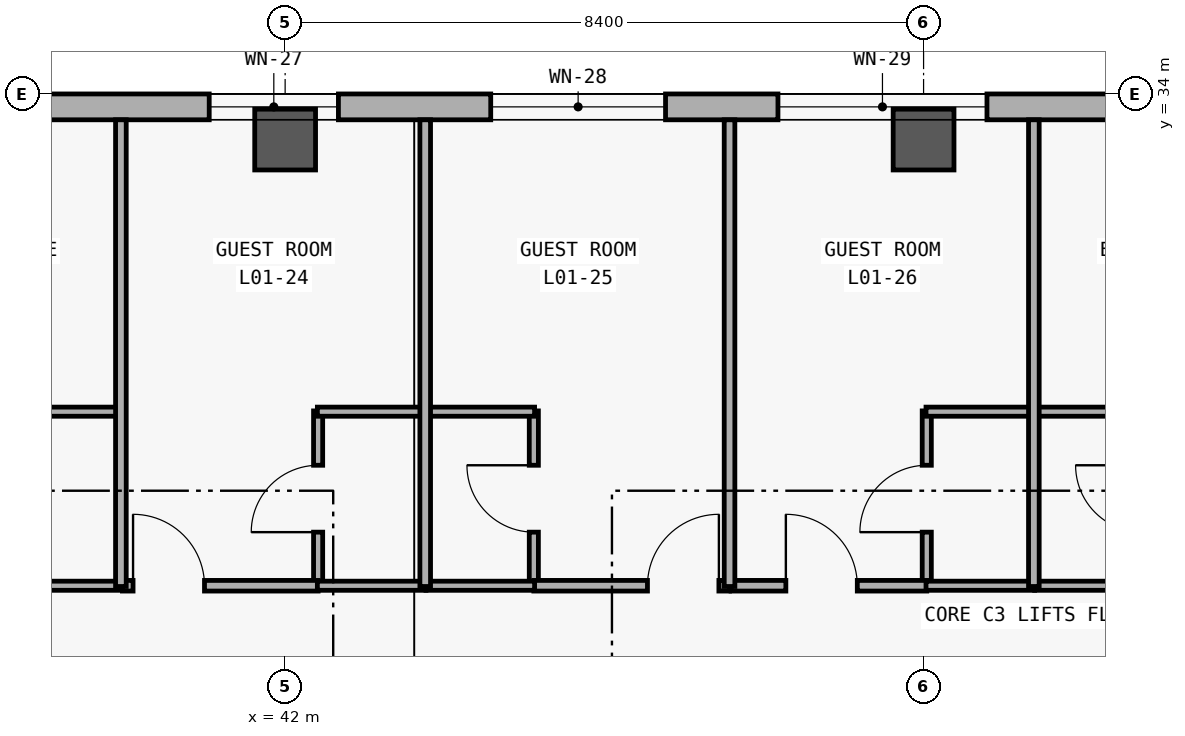
"""IFC4 building model, lengths in metres.
Left out: names, types, materials, properties, quantities, classifications, styles, units other than length and angle.
Written with IfcOpenShell. Run it as: python <this file> out.ifc"""

import sys

from ifc_helpers import new_model, si_unit, direction, frame, frame_2d, origin, origin_2d, place, context, subcontext, project, spatial, rectangle, extrude, element, fill, save


model = new_model("IFC4")
c1 = context("Model", 3, precision=1e-05, world=origin(), true_north=direction((0.0, 1.0)))
c2 = subcontext(c1, "Body", "Model", "MODEL_VIEW")
j1 = project(units=[si_unit("LENGTHUNIT", "METRE"), si_unit("PLANEANGLEUNIT", "RADIAN")], contexts=[c1])
p1 = place(None, origin())
s1 = spatial("IfcSite", under=j1, at=p1, CompositionType="ELEMENT")
p2 = place(p1, origin())
s2 = spatial("IfcBuilding", under=s1, at=p2, CompositionType="ELEMENT")
p3 = place(p2, frame((0.0, 0.0, 5.4)))
s3 = spatial("IfcBuildingStorey", under=s2, at=p3, CompositionType="ELEMENT", Elevation=5.4)
for number, where, z_axis, x_axis in (
    (1, (42.0, 33.4, 0.0), (0.0, 0.0, 1.0), (1.0, 0.0, 0.0)),
    (2, (50.4, 33.4, 0.0), (0.0, 0.0, 1.0), (1.0, 0.0, 0.0)),
):
    element("IfcColumn", number, at=place(p3, frame(where, z_axis=z_axis, x_axis=x_axis)), inside=s3, PredefinedType="COLUMN", context=c2, shape_type="SweptSolid", body=[
        extrude(rectangle(XDim=0.8, YDim=0.8, at=origin_2d()), origin(), (0.0, 0.0, 1.0), 5.4),
    ])
p4 = place(p3, frame((8.74, 33.83, 0.0), z_axis=(0.0, 0.0, 1.0), x_axis=(1.0, 0.0, 0.0)))
e3 = element("IfcWall", 3, at=p4, inside=s3, PredefinedType="SOLIDWALL", context=c2, shape_type="SweptSolid", body=[
    extrude(rectangle(XDim=83.32, YDim=0.34, at=frame_2d((41.66, 0.0))), origin(), (0.0, 0.0, 1.0), 5.1),
])
p5 = place(p4, frame((4.795, 0.0, 0.85)))
e4 = element("IfcOpeningElement", 4, at=p5, cuts=e3, PredefinedType="OPENING", context=c2, shape_type="SweptSolid", body=[
    extrude(rectangle(XDim=1.58, YDim=1.85, at=frame_2d((0.79, 0.925))), frame((0.0, 0.18, 0.0), z_axis=(0.0, -1.0, 0.0), x_axis=(1.0, 0.0, 0.0)), (0.0, 0.0, 1.0), 0.36),
])
p6 = place(p4, frame((11.542, 0.0, 0.85)))
e5 = element("IfcOpeningElement", 5, at=p6, cuts=e3, PredefinedType="OPENING", context=c2, shape_type="SweptSolid", body=[
    extrude(rectangle(XDim=3.1, YDim=2.2, at=frame_2d((1.55, 1.1))), frame((0.0, 0.18, 0.0), z_axis=(0.0, -1.0, 0.0), x_axis=(1.0, 0.0, 0.0)), (0.0, 0.0, 1.0), 0.36),
])
p7 = place(p4, frame((16.471, 0.0, 0.85)))
e6 = element("IfcOpeningElement", 6, at=p7, cuts=e3, PredefinedType="OPENING", context=c2, shape_type="SweptSolid", body=[
    extrude(rectangle(XDim=1.25, YDim=1.45, at=frame_2d((0.625, 0.725))), frame((0.0, 0.18, 0.0), z_axis=(0.0, -1.0, 0.0), x_axis=(1.0, 0.0, 0.0)), (0.0, 0.0, 1.0), 0.36),
])
p8 = place(p4, frame((20.425, 0.0, 0.85)))
e7 = element("IfcOpeningElement", 7, at=p8, cuts=e3, PredefinedType="OPENING", context=c2, shape_type="SweptSolid", body=[
    extrude(rectangle(XDim=1.35, YDim=1.55, at=frame_2d((0.675, 0.775))), frame((0.0, 0.18, 0.0), z_axis=(0.0, -1.0, 0.0), x_axis=(1.0, 0.0, 0.0)), (0.0, 0.0, 1.0), 0.36),
])
p9 = place(p4, frame((24.379, 0.0, 0.85)))
e8 = element("IfcOpeningElement", 8, at=p9, cuts=e3, PredefinedType="OPENING", context=c2, shape_type="SweptSolid", body=[
    extrude(rectangle(XDim=1.45, YDim=1.65, at=frame_2d((0.725, 0.825))), frame((0.0, 0.18, 0.0), z_axis=(0.0, -1.0, 0.0), x_axis=(1.0, 0.0, 0.0)), (0.0, 0.0, 1.0), 0.36),
])
p10 = place(p4, frame((28.332, 0.0, 0.85)))
e9 = element("IfcOpeningElement", 9, at=p10, cuts=e3, PredefinedType="OPENING", context=c2, shape_type="SweptSolid", body=[
    extrude(rectangle(XDim=1.55, YDim=1.65, at=frame_2d((0.775, 0.825))), frame((0.0, 0.18, 0.0), z_axis=(0.0, -1.0, 0.0), x_axis=(1.0, 0.0, 0.0)), (0.0, 0.0, 1.0), 0.36),
])
p11 = place(p4, frame((32.261, 0.0, 0.85)))
e10 = element("IfcOpeningElement", 10, at=p11, cuts=e3, PredefinedType="OPENING", context=c2, shape_type="SweptSolid", body=[
    extrude(rectangle(XDim=1.7, YDim=2.0, at=frame_2d((0.85, 1.0))), frame((0.0, 0.18, 0.0), z_axis=(0.0, -1.0, 0.0), x_axis=(1.0, 0.0, 0.0)), (0.0, 0.0, 1.0), 0.36),
])
p12 = place(p4, frame((35.965, 0.0, 0.85)))
e11 = element("IfcOpeningElement", 11, at=p12, cuts=e3, PredefinedType="OPENING", context=c2, shape_type="SweptSolid", body=[
    extrude(rectangle(XDim=2.3, YDim=2.05, at=frame_2d((1.15, 1.025))), frame((0.0, 0.18, 0.0), z_axis=(0.0, -1.0, 0.0), x_axis=(1.0, 0.0, 0.0)), (0.0, 0.0, 1.0), 0.36),
])
p13 = place(p4, frame((39.744, 0.0, 0.85)))
e12 = element("IfcOpeningElement", 12, at=p13, cuts=e3, PredefinedType="OPENING", context=c2, shape_type="SweptSolid", body=[
    extrude(rectangle(XDim=2.75, YDim=2.1, at=frame_2d((1.375, 1.05))), frame((0.0, 0.18, 0.0), z_axis=(0.0, -1.0, 0.0), x_axis=(1.0, 0.0, 0.0)), (0.0, 0.0, 1.0), 0.36),
])
p14 = place(p4, frame((44.533, 0.0, 0.85)))
e13 = element("IfcOpeningElement", 13, at=p14, cuts=e3, PredefinedType="OPENING", context=c2, shape_type="SweptSolid", body=[
    extrude(rectangle(XDim=1.18, YDim=1.5, at=frame_2d((0.59, 0.75))), frame((0.0, 0.18, 0.0), z_axis=(0.0, -1.0, 0.0), x_axis=(1.0, 0.0, 0.0)), (0.0, 0.0, 1.0), 0.36),
])
p15 = place(p4, frame((48.487, 0.0, 0.85)))
e14 = element("IfcOpeningElement", 14, at=p15, cuts=e3, PredefinedType="OPENING", context=c2, shape_type="SweptSolid", body=[
    extrude(rectangle(XDim=1.28, YDim=1.6, at=frame_2d((0.64, 0.8))), frame((0.0, 0.18, 0.0), z_axis=(0.0, -1.0, 0.0), x_axis=(1.0, 0.0, 0.0)), (0.0, 0.0, 1.0), 0.36),
])
p16 = place(p4, frame((52.441, 0.0, 0.85)))
e15 = element("IfcOpeningElement", 15, at=p16, cuts=e3, PredefinedType="OPENING", context=c2, shape_type="SweptSolid", body=[
    extrude(rectangle(XDim=1.38, YDim=1.7, at=frame_2d((0.69, 0.85))), frame((0.0, 0.18, 0.0), z_axis=(0.0, -1.0, 0.0), x_axis=(1.0, 0.0, 0.0)), (0.0, 0.0, 1.0), 0.36),
])
p17 = place(p4, frame((56.395, 0.0, 0.85)))
e16 = element("IfcOpeningElement", 16, at=p17, cuts=e3, PredefinedType="OPENING", context=c2, shape_type="SweptSolid", body=[
    extrude(rectangle(XDim=1.48, YDim=1.8, at=frame_2d((0.74, 0.9))), frame((0.0, 0.18, 0.0), z_axis=(0.0, -1.0, 0.0), x_axis=(1.0, 0.0, 0.0)), (0.0, 0.0, 1.0), 0.36),
])
p18 = place(p4, frame((60.349, 0.0, 0.85)))
e17 = element("IfcOpeningElement", 17, at=p18, cuts=e3, PredefinedType="OPENING", context=c2, shape_type="SweptSolid", body=[
    extrude(rectangle(XDim=1.58, YDim=1.85, at=frame_2d((0.79, 0.925))), frame((0.0, 0.18, 0.0), z_axis=(0.0, -1.0, 0.0), x_axis=(1.0, 0.0, 0.0)), (0.0, 0.0, 1.0), 0.36),
])
p19 = place(p4, frame((64.302, 0.0, 0.85)))
e18 = element("IfcOpeningElement", 18, at=p19, cuts=e3, PredefinedType="OPENING", context=c2, shape_type="SweptSolid", body=[
    extrude(rectangle(XDim=1.68, YDim=1.9, at=frame_2d((0.84, 0.95))), frame((0.0, 0.18, 0.0), z_axis=(0.0, -1.0, 0.0), x_axis=(1.0, 0.0, 0.0)), (0.0, 0.0, 1.0), 0.36),
])
p20 = place(p4, frame((68.256, 0.0, 0.85)))
e19 = element("IfcOpeningElement", 19, at=p20, cuts=e3, PredefinedType="OPENING", context=c2, shape_type="SweptSolid", body=[
    extrude(rectangle(XDim=1.78, YDim=1.95, at=frame_2d((0.89, 0.975))), frame((0.0, 0.18, 0.0), z_axis=(0.0, -1.0, 0.0), x_axis=(1.0, 0.0, 0.0)), (0.0, 0.0, 1.0), 0.36),
])
p21 = place(p4, frame((72.21, 0.0, 0.85)))
e20 = element("IfcOpeningElement", 20, at=p21, cuts=e3, PredefinedType="OPENING", context=c2, shape_type="SweptSolid", body=[
    extrude(rectangle(XDim=1.88, YDim=1.95, at=frame_2d((0.94, 0.975))), frame((0.0, 0.18, 0.0), z_axis=(0.0, -1.0, 0.0), x_axis=(1.0, 0.0, 0.0)), (0.0, 0.0, 1.0), 0.36),
])
p22 = place(p4, frame((76.129, 0.0, 0.85)))
e21 = element("IfcOpeningElement", 21, at=p22, cuts=e3, PredefinedType="OPENING", context=c2, shape_type="SweptSolid", body=[
    extrude(rectangle(XDim=2.05, YDim=1.95, at=frame_2d((1.025, 0.975))), frame((0.0, 0.18, 0.0), z_axis=(0.0, -1.0, 0.0), x_axis=(1.0, 0.0, 0.0)), (0.0, 0.0, 1.0), 0.36),
])
p23 = place(p4, frame((80.068, 0.0, 0.85)))
e22 = element("IfcOpeningElement", 22, at=p23, cuts=e3, PredefinedType="OPENING", context=c2, shape_type="SweptSolid", body=[
    extrude(rectangle(XDim=2.18, YDim=1.95, at=frame_2d((1.09, 0.975))), frame((0.0, 0.18, 0.0), z_axis=(0.0, -1.0, 0.0), x_axis=(1.0, 0.0, 0.0)), (0.0, 0.0, 1.0), 0.36),
])
p24 = place(p3, frame((42.434, 27.52, 0.0), z_axis=(0.0, 0.0, 1.0), x_axis=(0.0, 1.0, 0.0)))
e23 = element("IfcWall", 23, at=p24, inside=s3, PredefinedType="PARTITIONING", context=c2, shape_type="SweptSolid", body=[
    extrude(rectangle(XDim=2.31, YDim=0.12, at=frame_2d((1.155, 0.0))), origin(), (0.0, 0.0, 1.0), 4.18),
])
p25 = place(p24, frame((0.715, 0.0, 0.0)))
e24 = element("IfcOpeningElement", 24, at=p25, cuts=e23, PredefinedType="OPENING", context=c2, shape_type="SweptSolid", body=[
    extrude(rectangle(XDim=0.88, YDim=2.15, at=frame_2d((0.44, 1.075))), frame((0.0, 0.07, 0.0), z_axis=(0.0, -1.0, 0.0), x_axis=(1.0, 0.0, 0.0)), (0.0, 0.0, 1.0), 0.14),
])
p26 = place(p3, frame((45.272, 27.52, 0.0), z_axis=(0.0, 0.0, 1.0), x_axis=(0.0, 1.0, 0.0)))
e25 = element("IfcWall", 25, at=p26, inside=s3, PredefinedType="PARTITIONING", context=c2, shape_type="SweptSolid", body=[
    extrude(rectangle(XDim=2.31, YDim=0.12, at=frame_2d((1.155, 0.0))), origin(), (0.0, 0.0, 1.0), 4.18),
])
p27 = place(p26, frame((0.715, 0.0, 0.0)))
e26 = element("IfcOpeningElement", 26, at=p27, cuts=e25, PredefinedType="OPENING", context=c2, shape_type="SweptSolid", body=[
    extrude(rectangle(XDim=0.88, YDim=2.15, at=frame_2d((0.44, 1.075))), frame((0.0, 0.07, 0.0), z_axis=(0.0, -1.0, 0.0), x_axis=(1.0, 0.0, 0.0)), (0.0, 0.0, 1.0), 0.14),
])
p28 = place(p3, frame((50.442, 27.52, 0.0), z_axis=(0.0, 0.0, 1.0), x_axis=(0.0, 1.0, 0.0)))
e27 = element("IfcWall", 27, at=p28, inside=s3, PredefinedType="PARTITIONING", context=c2, shape_type="SweptSolid", body=[
    extrude(rectangle(XDim=2.31, YDim=0.12, at=frame_2d((1.155, 0.0))), origin(), (0.0, 0.0, 1.0), 4.18),
])
p29 = place(p28, frame((0.715, 0.0, 0.0)))
e28 = element("IfcOpeningElement", 28, at=p29, cuts=e27, PredefinedType="OPENING", context=c2, shape_type="SweptSolid", body=[
    extrude(rectangle(XDim=0.88, YDim=2.15, at=frame_2d((0.44, 1.075))), frame((0.0, 0.07, 0.0), z_axis=(0.0, -1.0, 0.0), x_axis=(1.0, 0.0, 0.0)), (0.0, 0.0, 1.0), 0.14),
])
p30 = place(p3, frame((39.859, 27.53, 0.0), z_axis=(0.0, 0.0, 1.0), x_axis=(1.0, 0.0, 0.0)))
e29 = element("IfcWall", 29, at=p30, inside=s3, PredefinedType="PARTITIONING", context=c2, shape_type="SweptSolid", body=[
    extrude(rectangle(XDim=2.575, YDim=0.14, at=frame_2d((1.288, 0.0))), origin(), (0.0, 0.0, 1.0), 4.18),
])
p31 = place(p30, frame((0.14, 0.0, 0.0)))
e30 = element("IfcOpeningElement", 30, at=p31, cuts=e29, PredefinedType="OPENING", context=c2, shape_type="SweptSolid", body=[
    extrude(rectangle(XDim=0.94, YDim=2.2, at=frame_2d((0.47, 1.1))), frame((0.0, 0.08, 0.0), z_axis=(0.0, -1.0, 0.0), x_axis=(1.0, 0.0, 0.0)), (0.0, 0.0, 1.0), 0.16),
])
p32 = place(p3, frame((45.272, 27.53, 0.0), z_axis=(0.0, 0.0, 1.0), x_axis=(1.0, 0.0, 0.0)))
e31 = element("IfcWall", 31, at=p32, inside=s3, PredefinedType="PARTITIONING", context=c2, shape_type="SweptSolid", body=[
    extrude(rectangle(XDim=2.575, YDim=0.14, at=frame_2d((1.288, 0.0))), origin(), (0.0, 0.0, 1.0), 4.18),
])
p33 = place(p32, frame((1.495, 0.0, 0.0)))
e32 = element("IfcOpeningElement", 32, at=p33, cuts=e31, PredefinedType="OPENING", context=c2, shape_type="SweptSolid", body=[
    extrude(rectangle(XDim=0.94, YDim=2.2, at=frame_2d((0.47, 1.1))), frame((0.0, 0.08, 0.0), z_axis=(0.0, -1.0, 0.0), x_axis=(1.0, 0.0, 0.0)), (0.0, 0.0, 1.0), 0.16),
])
p34 = place(p3, frame((47.867, 27.53, 0.0), z_axis=(0.0, 0.0, 1.0), x_axis=(1.0, 0.0, 0.0)))
e33 = element("IfcWall", 33, at=p34, inside=s3, PredefinedType="PARTITIONING", context=c2, shape_type="SweptSolid", body=[
    extrude(rectangle(XDim=2.575, YDim=0.14, at=frame_2d((1.288, 0.0))), origin(), (0.0, 0.0, 1.0), 4.18),
])
p35 = place(p34, frame((0.721, 0.0, 0.0)))
e34 = element("IfcOpeningElement", 34, at=p35, cuts=e33, PredefinedType="OPENING", context=c2, shape_type="SweptSolid", body=[
    extrude(rectangle(XDim=0.94, YDim=2.2, at=frame_2d((0.47, 1.1))), frame((0.0, 0.08, 0.0), z_axis=(0.0, -1.0, 0.0), x_axis=(1.0, 0.0, 0.0)), (0.0, 0.0, 1.0), 0.16),
])
for number, where, z_axis, x_axis in (
    (35, (38.421, 27.53, 0.0), (0.0, 0.0, 1.0), (1.0, 0.0, 0.0)),
    (36, (38.421, 29.82, 0.0), (0.0, 0.0, 1.0), (1.0, 0.0, 0.0)),
):
    element("IfcWall", number, at=place(p3, frame(where, z_axis=z_axis, x_axis=x_axis)), inside=s3, PredefinedType="PARTITIONING", context=c2, shape_type="SweptSolid", body=[
        extrude(rectangle(XDim=1.428, YDim=0.12, at=frame_2d((0.714, 0.0))), origin(), (0.0, 0.0, 1.0), 4.18),
    ])
for number, where, z_axis, x_axis in (
    (37, (42.424, 27.53, 0.0), (0.0, 0.0, 1.0), (1.0, 0.0, 0.0)),
    (38, (42.424, 29.82, 0.0), (0.0, 0.0, 1.0), (1.0, 0.0, 0.0)),
    (39, (43.853, 27.53, 0.0), (0.0, 0.0, 1.0), (1.0, 0.0, 0.0)),
    (40, (43.853, 29.82, 0.0), (0.0, 0.0, 1.0), (1.0, 0.0, 0.0)),
):
    element("IfcWall", number, at=place(p3, frame(where, z_axis=z_axis, x_axis=x_axis)), inside=s3, PredefinedType="PARTITIONING", context=c2, shape_type="SweptSolid", body=[
        extrude(rectangle(XDim=1.429, YDim=0.12, at=frame_2d((0.714, 0.0))), origin(), (0.0, 0.0, 1.0), 4.18),
    ])
for number, where, z_axis, x_axis in (
    (41, (50.432, 27.53, 0.0), (0.0, 0.0, 1.0), (1.0, 0.0, 0.0)),
    (42, (50.432, 29.82, 0.0), (0.0, 0.0, 1.0), (1.0, 0.0, 0.0)),
):
    element("IfcWall", number, at=place(p3, frame(where, z_axis=z_axis, x_axis=x_axis)), inside=s3, PredefinedType="PARTITIONING", context=c2, shape_type="SweptSolid", body=[
        extrude(rectangle(XDim=1.429, YDim=0.12, at=frame_2d((0.715, 0.0))), origin(), (0.0, 0.0, 1.0), 4.18),
    ])
for number, where, z_axis, x_axis in (
    (43, (51.861, 27.53, 0.0), (0.0, 0.0, 1.0), (1.0, 0.0, 0.0)),
    (44, (51.861, 29.82, 0.0), (0.0, 0.0, 1.0), (1.0, 0.0, 0.0)),
):
    element("IfcWall", number, at=place(p3, frame(where, z_axis=z_axis, x_axis=x_axis)), inside=s3, PredefinedType="PARTITIONING", context=c2, shape_type="SweptSolid", body=[
        extrude(rectangle(XDim=1.429, YDim=0.12, at=frame_2d((0.714, 0.0))), origin(), (0.0, 0.0, 1.0), 4.18),
    ])
for number, where, z_axis, x_axis in (
    (45, (39.839, 27.52, 0.0), (0.0, 0.0, 1.0), (0.0, 1.0, 0.0)),
    (46, (43.843, 27.52, 0.0), (0.0, 0.0, 1.0), (0.0, 1.0, 0.0)),
    (47, (47.847, 27.52, 0.0), (0.0, 0.0, 1.0), (0.0, 1.0, 0.0)),
    (48, (51.851, 27.52, 0.0), (0.0, 0.0, 1.0), (0.0, 1.0, 0.0)),
):
    element("IfcWall", number, at=place(p3, frame(where, z_axis=z_axis, x_axis=x_axis)), inside=s3, PredefinedType="PARTITIONING", context=c2, shape_type="SweptSolid", body=[
        extrude(rectangle(XDim=6.14, YDim=0.14, at=frame_2d((3.07, 0.0))), origin(), (0.0, 0.0, 1.0), 4.18),
    ])
p36 = place(p11, origin())
e49 = element("IfcWindow", 49, at=p36, inside=s3, PartitioningType="SINGLE_PANEL", PredefinedType="WINDOW", context=c2, shape_type="SweptSolid", body=[
    extrude(rectangle(XDim=1.7, YDim=2.0, at=frame_2d((0.85, 1.0))), frame((0.0, 0.03, 0.0), z_axis=(0.0, -1.0, 0.0), x_axis=(1.0, 0.0, 0.0)), (0.0, 0.0, 1.0), 0.06),
])
fill(e10, e49)
p37 = place(p12, origin())
e50 = element("IfcWindow", 50, at=p37, inside=s3, PartitioningType="SINGLE_PANEL", PredefinedType="WINDOW", context=c2, shape_type="SweptSolid", body=[
    extrude(rectangle(XDim=2.3, YDim=2.05, at=frame_2d((1.15, 1.025))), frame((0.0, 0.03, 0.0), z_axis=(0.0, -1.0, 0.0), x_axis=(1.0, 0.0, 0.0)), (0.0, 0.0, 1.0), 0.06),
])
fill(e11, e50)
p38 = place(p13, origin())
e51 = element("IfcWindow", 51, at=p38, inside=s3, PartitioningType="SINGLE_PANEL", PredefinedType="WINDOW", context=c2, shape_type="SweptSolid", body=[
    extrude(rectangle(XDim=2.75, YDim=2.1, at=frame_2d((1.375, 1.05))), frame((0.0, 0.03, 0.0), z_axis=(0.0, -1.0, 0.0), x_axis=(1.0, 0.0, 0.0)), (0.0, 0.0, 1.0), 0.06),
])
fill(e12, e51)
p39 = place(p25, origin())
e52 = element("IfcDoor", 52, at=p39, inside=s3, OperationType="SINGLE_SWING_LEFT", PredefinedType="DOOR", context=c2, shape_type="SweptSolid", body=[
    extrude(rectangle(XDim=0.88, YDim=2.15, at=frame_2d((0.44, 1.075))), frame((0.0, 0.025, 0.0), z_axis=(0.0, -1.0, 0.0), x_axis=(1.0, 0.0, 0.0)), (0.0, 0.0, 1.0), 0.05),
])
fill(e24, e52)
p40 = place(p27, origin())
e53 = element("IfcDoor", 53, at=p40, inside=s3, OperationType="SINGLE_SWING_RIGHT", PredefinedType="DOOR", context=c2, shape_type="SweptSolid", body=[
    extrude(rectangle(XDim=0.88, YDim=2.15, at=frame_2d((0.44, 1.075))), frame((0.0, 0.025, 0.0), z_axis=(0.0, -1.0, 0.0), x_axis=(1.0, 0.0, 0.0)), (0.0, 0.0, 1.0), 0.05),
])
fill(e26, e53)
p41 = place(p29, origin())
e54 = element("IfcDoor", 54, at=p41, inside=s3, OperationType="SINGLE_SWING_LEFT", PredefinedType="DOOR", context=c2, shape_type="SweptSolid", body=[
    extrude(rectangle(XDim=0.88, YDim=2.15, at=frame_2d((0.44, 1.075))), frame((0.0, 0.025, 0.0), z_axis=(0.0, -1.0, 0.0), x_axis=(1.0, 0.0, 0.0)), (0.0, 0.0, 1.0), 0.05),
])
fill(e28, e54)
p42 = place(p31, origin())
e55 = element("IfcDoor", 55, at=p42, inside=s3, OperationType="SINGLE_SWING_LEFT", PredefinedType="DOOR", context=c2, shape_type="SweptSolid", body=[
    extrude(rectangle(XDim=0.94, YDim=2.2, at=frame_2d((0.47, 1.1))), frame((0.0, 0.025, 0.0), z_axis=(0.0, -1.0, 0.0), x_axis=(1.0, 0.0, 0.0)), (0.0, 0.0, 1.0), 0.05),
])
fill(e30, e55)
p43 = place(p33, origin())
e56 = element("IfcDoor", 56, at=p43, inside=s3, OperationType="SINGLE_SWING_RIGHT", PredefinedType="DOOR", context=c2, shape_type="SweptSolid", body=[
    extrude(rectangle(XDim=0.94, YDim=2.2, at=frame_2d((0.47, 1.1))), frame((0.0, 0.025, 0.0), z_axis=(0.0, -1.0, 0.0), x_axis=(1.0, 0.0, 0.0)), (0.0, 0.0, 1.0), 0.05),
])
fill(e32, e56)
p44 = place(p35, origin())
e57 = element("IfcDoor", 57, at=p44, inside=s3, OperationType="SINGLE_SWING_LEFT", PredefinedType="DOOR", context=c2, shape_type="SweptSolid", body=[
    extrude(rectangle(XDim=0.94, YDim=2.2, at=frame_2d((0.47, 1.1))), frame((0.0, 0.025, 0.0), z_axis=(0.0, -1.0, 0.0), x_axis=(1.0, 0.0, 0.0)), (0.0, 0.0, 1.0), 0.05),
])
fill(e34, e57)
save(model, sys.argv[1])
